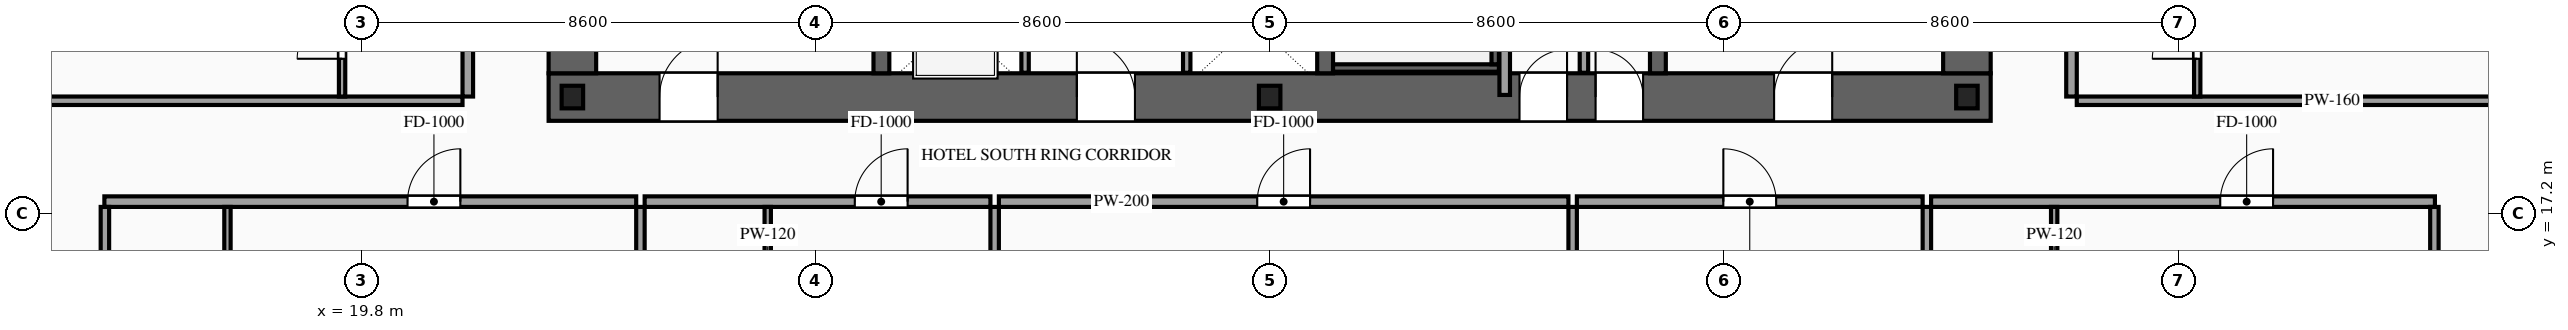
"""IFC4 building model, lengths in metres.
Left out: names, types, materials, properties, quantities, classifications, styles, units other than length and angle.
Written with IfcOpenShell. Run it as: python <this file> out.ifc"""

import sys

from ifc_helpers import new_model, si_unit, direction, frame, frame_2d, origin, origin_2d, place, context, subcontext, project, spatial, rectangle, i_section, extrude, source, transform, mapped, element, fill, save


model = new_model("IFC4")
c1 = context("Model", 3, precision=1e-05, world=origin(), true_north=direction((0.0, 1.0)))
c2 = subcontext(c1, "Body", "Model", "MODEL_VIEW")
j1 = project(units=[si_unit("LENGTHUNIT", "METRE"), si_unit("PLANEANGLEUNIT", "RADIAN")], contexts=[c1])
p1 = place(None, origin())
s1 = spatial("IfcSite", under=j1, at=p1, CompositionType="ELEMENT")
p2 = place(p1, origin())
s2 = spatial("IfcBuilding", under=s1, at=p2, CompositionType="ELEMENT")
p3 = place(p2, frame((0.0, 0.0, 53.2)))
s3 = spatial("IfcBuildingStorey", under=s2, at=p3, CompositionType="ELEMENT", Elevation=53.2)
p4 = place(p3, frame((23.35, 19.4, 0.0), z_axis=(0.0, 0.0, 1.0), x_axis=(1.0, 0.0, 0.0)))
e1 = element("IfcWall", 1, at=p4, inside=s3, PredefinedType="SHEAR", context=c2, shape_type="SweptSolid", body=[
    extrude(rectangle(XDim=27.3, YDim=0.9, at=frame_2d((13.65, 0.0))), origin(), (0.0, 0.0, 1.0), 3.6),
])
p5 = place(p4, frame((2.1, 0.0, 0.0)))
e2 = element("IfcOpeningElement", 2, at=p5, cuts=e1, PredefinedType="OPENING", context=c2, shape_type="SweptSolid", body=[
    extrude(rectangle(XDim=1.1, YDim=2.2, at=frame_2d((0.55, 1.1))), frame((0.0, 0.465, 0.0), z_axis=(0.0, -1.0, 0.0), x_axis=(1.0, 0.0, 0.0)), (0.0, 0.0, 1.0), 0.93),
])
p6 = place(p4, frame((10.0, 0.0, 0.0)))
e3 = element("IfcOpeningElement", 3, at=p6, cuts=e1, PredefinedType="OPENING", context=c2, shape_type="SweptSolid", body=[
    extrude(rectangle(XDim=1.1, YDim=2.2, at=frame_2d((0.55, 1.1))), frame((0.0, 0.465, 0.0), z_axis=(0.0, -1.0, 0.0), x_axis=(1.0, 0.0, 0.0)), (0.0, 0.0, 1.0), 0.93),
])
p7 = place(p4, frame((23.2, 0.0, 0.0)))
e4 = element("IfcOpeningElement", 4, at=p7, cuts=e1, PredefinedType="OPENING", context=c2, shape_type="SweptSolid", body=[
    extrude(rectangle(XDim=1.1, YDim=2.2, at=frame_2d((0.55, 1.1))), frame((0.0, 0.465, 0.0), z_axis=(0.0, -1.0, 0.0), x_axis=(1.0, 0.0, 0.0)), (0.0, 0.0, 1.0), 0.93),
])
p8 = place(p4, frame((19.82, 0.0, 0.0)))
e5 = element("IfcOpeningElement", 5, at=p8, cuts=e1, PredefinedType="OPENING", context=c2, shape_type="SweptSolid", body=[
    extrude(rectangle(XDim=0.9, YDim=2.15, at=frame_2d((0.45, 1.075))), frame((0.0, 0.465, 0.0), z_axis=(0.0, -1.0, 0.0), x_axis=(1.0, 0.0, 0.0)), (0.0, 0.0, 1.0), 0.93),
])
p9 = place(p4, frame((18.38, 0.0, 0.0)))
e6 = element("IfcOpeningElement", 6, at=p9, cuts=e1, PredefinedType="OPENING", context=c2, shape_type="SweptSolid", body=[
    extrude(rectangle(XDim=0.9, YDim=2.15, at=frame_2d((0.45, 1.075))), frame((0.0, 0.465, 0.0), z_axis=(0.0, -1.0, 0.0), x_axis=(1.0, 0.0, 0.0)), (0.0, 0.0, 1.0), 0.93),
])
m1 = source(origin(), c2, "Body", "SweptSolid", [
    extrude(rectangle(XDim=11.9, YDim=0.9, at=frame_2d((5.95, 0.0))), origin(), (0.0, 0.0, 1.0), 3.6),
])
for number, where, z_axis, x_axis in (
    (7, (23.8, 19.85, 0.0), (0.0, 0.0, 1.0), (0.0, 1.0, 0.0)),
    (8, (50.2, 19.85, 0.0), (0.0, 0.0, 1.0), (0.0, 1.0, 0.0)),
):
    element("IfcWall", number, at=place(p3, frame(where, z_axis=z_axis, x_axis=x_axis)), inside=s3, PredefinedType="SHEAR", context=c2, shape_type="MappedRepresentation", body=[
        mapped(m1, transform((0.0, 0.0, 0.0), scale=1.0)),
    ])
m2 = source(origin(), c2, "Body", "SweptSolid", [
    extrude(rectangle(XDim=11.9, YDim=0.3, at=frame_2d((5.95, 0.0))), origin(), (0.0, 0.0, 1.0), 3.6),
])
for number, where, z_axis, x_axis in (
    (9, (29.65, 19.85, 0.0), (0.0, 0.0, 1.0), (0.0, 1.0, 0.0)),
    (10, (38.05, 19.85, 0.0), (0.0, 0.0, 1.0), (0.0, 1.0, 0.0)),
    (11, (44.35, 19.85, 0.0), (0.0, 0.0, 1.0), (0.0, 1.0, 0.0)),
):
    element("IfcWall", number, at=place(p3, frame(where, z_axis=z_axis, x_axis=x_axis)), inside=s3, PredefinedType="SOLIDWALL", context=c2, shape_type="MappedRepresentation", body=[
        mapped(m2, transform((0.0, 0.0, 0.0), scale=1.0)),
    ])
m3 = source(origin(), c2, "Body", "SweptSolid", [
    extrude(i_section(OverallWidth=0.407, OverallDepth=0.428, WebThickness=0.02, FlangeThickness=0.035, at=origin_2d()), origin(), (0.0, 0.0, 1.0), 3.6),
])
for number, where, z_axis, x_axis in (
    (12, (23.8, 19.4, 0.0), (0.0, 0.0, 1.0), (1.0, 0.0, 0.0)),
    (13, (37.0, 19.4, 0.0), (0.0, 0.0, 1.0), (1.0, 0.0, 0.0)),
    (14, (50.2, 19.4, 0.0), (0.0, 0.0, 1.0), (1.0, 0.0, 0.0)),
):
    element("IfcColumn", number, at=place(p3, frame(where, z_axis=z_axis, x_axis=x_axis)), inside=s3, PredefinedType="COLUMN", context=c2, shape_type="MappedRepresentation", body=[
        mapped(m3, transform((0.0, 0.0, 0.0), scale=1.0)),
    ])
p10 = place(p3, frame((32.37, 19.86, 0.0), z_axis=(0.0, 0.0, 1.0), x_axis=(0.0, 1.0, 0.0)))
e15 = element("IfcWall", 15, at=p10, inside=s3, PredefinedType="SOLIDWALL", context=c2, shape_type="SweptSolid", body=[
    extrude(rectangle(XDim=2.04, YDim=0.14, at=frame_2d((1.02, 0.0))), origin(), (0.0, 0.0, 1.0), 3.38),
])
p11 = place(p10, frame((0.47, 0.0, 0.0)))
e16 = element("IfcOpeningElement", 16, at=p11, cuts=e15, PredefinedType="OPENING", context=c2, shape_type="SweptSolid", body=[
    extrude(rectangle(XDim=1.1, YDim=2.2, at=frame_2d((0.55, 1.1))), frame((0.0, 0.085, 0.0), z_axis=(0.0, -1.0, 0.0), x_axis=(1.0, 0.0, 0.0)), (0.0, 0.0, 1.0), 0.17),
])
m4 = source(origin(), c2, "Body", "SweptSolid", [
    extrude(rectangle(XDim=2.04, YDim=0.14, at=frame_2d((1.02, 0.0))), origin(), (0.0, 0.0, 1.0), 3.38),
])
p12 = place(p3, frame((35.43, 19.86, 0.0), z_axis=(0.0, 0.0, 1.0), x_axis=(0.0, 1.0, 0.0)))
e17 = element("IfcWall", 17, at=p12, inside=s3, PredefinedType="SOLIDWALL", context=c2, shape_type="MappedRepresentation", body=[
    mapped(m4, transform((0.0, 0.0, 0.0), scale=1.0)),
])
m5 = source(origin(), c2, "Body", "SweptSolid", [
    extrude(rectangle(XDim=3.14, YDim=0.14, at=frame_2d((1.57, 0.0))), origin(), (0.0, 0.0, 1.0), 3.38),
])
p13 = place(p3, frame((38.2, 19.95, 0.0), z_axis=(0.0, 0.0, 1.0), x_axis=(1.0, 0.0, 0.0)))
e18 = element("IfcWall", 18, at=p13, inside=s3, PredefinedType="SOLIDWALL", context=c2, shape_type="MappedRepresentation", body=[
    mapped(m5, transform((0.0, 0.0, 0.0), scale=1.0)),
])
m6 = source(origin(), c2, "Body", "SweptSolid", [
    extrude(rectangle(XDim=8.94, YDim=0.14, at=frame_2d((4.47, 0.0))), origin(), (0.0, 0.0, 1.0), 3.38),
])
p14 = place(p3, frame((41.27, 20.02, 0.0), z_axis=(0.0, 0.0, 1.0), x_axis=(0.0, 1.0, 0.0)))
e19 = element("IfcWall", 19, at=p14, inside=s3, PredefinedType="SOLIDWALL", context=c2, shape_type="MappedRepresentation", body=[
    mapped(m6, transform((0.0, 0.0, 0.0), scale=1.0)),
])
m7 = source(origin(), c2, "Body", "SweptSolid", [
    extrude(rectangle(XDim=1.34, YDim=0.16, at=frame_2d((0.67, 0.0))), origin(), (0.0, 0.0, 1.0), 3.38),
])
p15 = place(p3, frame((42.95, 19.86, 0.0), z_axis=(0.0, 0.0, 1.0), x_axis=(0.0, 1.0, 0.0)))
e20 = element("IfcWall", 20, at=p15, inside=s3, PredefinedType="PARTITIONING", context=c2, shape_type="MappedRepresentation", body=[
    mapped(m7, transform((0.0, 0.0, 0.0), scale=1.0)),
])
m8 = source(origin(), c2, "Body", "SweptSolid", [
    extrude(rectangle(XDim=6.51, YDim=0.2, at=frame_2d((3.255, 0.0))), origin(), (0.0, 0.0, 1.0), 3.38),
])
p16 = place(p3, frame((41.45, 19.44, 0.0), z_axis=(0.0, 0.0, 1.0), x_axis=(0.0, 1.0, 0.0)))
e21 = element("IfcWall", 21, at=p16, inside=s3, PredefinedType="PARTITIONING", context=c2, shape_type="MappedRepresentation", body=[
    mapped(m8, transform((0.0, 0.0, 0.0), scale=1.0)),
])
p17 = place(p3, frame((14.94, 17.42, 0.0), z_axis=(0.0, 0.0, 1.0), x_axis=(1.0, 0.0, 0.0)))
e22 = element("IfcWall", 22, at=p17, inside=s3, PredefinedType="PARTITIONING", context=c2, shape_type="SweptSolid", body=[
    extrude(rectangle(XDim=10.068, YDim=0.2, at=frame_2d((5.034, 0.0))), origin(), (0.0, 0.0, 1.0), 3.38),
])
p18 = place(p17, frame((5.739, 0.0, 0.0)))
e23 = element("IfcOpeningElement", 23, at=p18, cuts=e22, PredefinedType="OPENING", context=c2, shape_type="SweptSolid", body=[
    extrude(rectangle(XDim=1.0, YDim=2.2, at=frame_2d((0.5, 1.1))), frame((0.0, 0.115, 0.0), z_axis=(0.0, -1.0, 0.0), x_axis=(1.0, 0.0, 0.0)), (0.0, 0.0, 1.0), 0.23),
])
m9 = source(origin(), c2, "Body", "SweptSolid", [
    extrude(rectangle(XDim=16.47, YDim=0.16, at=frame_2d((8.235, 0.0))), origin(), (0.0, 0.0, 1.0), 3.38),
])
p19 = place(p3, frame((25.088, 0.85, 0.0), z_axis=(0.0, 0.0, 1.0), x_axis=(0.0, 1.0, 0.0)))
e24 = element("IfcWall", 24, at=p19, inside=s3, PredefinedType="PARTITIONING", context=c2, shape_type="MappedRepresentation", body=[
    mapped(m9, transform((0.0, 0.0, 0.0), scale=1.0)),
])
m10 = source(origin(), c2, "Body", "SweptSolid", [
    extrude(rectangle(XDim=2.42, YDim=0.12, at=frame_2d((1.21, 0.0))), origin(), (0.0, 0.0, 1.0), 3.38),
])
p20 = place(p3, frame((17.27, 14.9, 0.0), z_axis=(0.0, 0.0, 1.0), x_axis=(0.0, 1.0, 0.0)))
e25 = element("IfcWall", 25, at=p20, inside=s3, PredefinedType="PARTITIONING", context=c2, shape_type="MappedRepresentation", body=[
    mapped(m10, transform((0.0, 0.0, 0.0), scale=1.0)),
])
p21 = place(p3, frame((25.168, 17.42, 0.0), z_axis=(0.0, 0.0, 1.0), x_axis=(1.0, 0.0, 0.0)))
e26 = element("IfcWall", 26, at=p21, inside=s3, PredefinedType="PARTITIONING", context=c2, shape_type="SweptSolid", body=[
    extrude(rectangle(XDim=6.546, YDim=0.2, at=frame_2d((3.273, 0.0))), origin(), (0.0, 0.0, 1.0), 3.38),
])
p22 = place(p21, frame((3.978, 0.0, 0.0)))
e27 = element("IfcOpeningElement", 27, at=p22, cuts=e26, PredefinedType="OPENING", context=c2, shape_type="SweptSolid", body=[
    extrude(rectangle(XDim=1.0, YDim=2.2, at=frame_2d((0.5, 1.1))), frame((0.0, 0.115, 0.0), z_axis=(0.0, -1.0, 0.0), x_axis=(1.0, 0.0, 0.0)), (0.0, 0.0, 1.0), 0.23),
])
p23 = place(p3, frame((31.794, 0.85, 0.0), z_axis=(0.0, 0.0, 1.0), x_axis=(0.0, 1.0, 0.0)))
e28 = element("IfcWall", 28, at=p23, inside=s3, PredefinedType="PARTITIONING", context=c2, shape_type="MappedRepresentation", body=[
    mapped(m9, transform((0.0, 0.0, 0.0), scale=1.0)),
])
p24 = place(p3, frame((27.498, 14.9, 0.0), z_axis=(0.0, 0.0, 1.0), x_axis=(0.0, 1.0, 0.0)))
e29 = element("IfcWall", 29, at=p24, inside=s3, PredefinedType="PARTITIONING", context=c2, shape_type="MappedRepresentation", body=[
    mapped(m10, transform((0.0, 0.0, 0.0), scale=1.0)),
])
p25 = place(p3, frame((31.874, 17.42, 0.0), z_axis=(0.0, 0.0, 1.0), x_axis=(1.0, 0.0, 0.0)))
e30 = element("IfcWall", 30, at=p25, inside=s3, PredefinedType="PARTITIONING", context=c2, shape_type="SweptSolid", body=[
    extrude(rectangle(XDim=10.782, YDim=0.2, at=frame_2d((5.391, 0.0))), origin(), (0.0, 0.0, 1.0), 3.38),
])
p26 = place(p25, frame((4.891, 0.0, 0.0)))
e31 = element("IfcOpeningElement", 31, at=p26, cuts=e30, PredefinedType="OPENING", context=c2, shape_type="SweptSolid", body=[
    extrude(rectangle(XDim=1.0, YDim=2.2, at=frame_2d((0.5, 1.1))), frame((0.0, 0.115, 0.0), z_axis=(0.0, -1.0, 0.0), x_axis=(1.0, 0.0, 0.0)), (0.0, 0.0, 1.0), 0.23),
])
p27 = place(p3, frame((42.736, 0.85, 0.0), z_axis=(0.0, 0.0, 1.0), x_axis=(0.0, 1.0, 0.0)))
e32 = element("IfcWall", 32, at=p27, inside=s3, PredefinedType="PARTITIONING", context=c2, shape_type="MappedRepresentation", body=[
    mapped(m9, transform((0.0, 0.0, 0.0), scale=1.0)),
])
p28 = place(p3, frame((42.816, 17.42, 0.0), z_axis=(0.0, 0.0, 1.0), x_axis=(1.0, 0.0, 0.0)))
e33 = element("IfcWall", 33, at=p28, inside=s3, PredefinedType="PARTITIONING", context=c2, shape_type="SweptSolid", body=[
    extrude(rectangle(XDim=6.546, YDim=0.2, at=frame_2d((3.273, 0.0))), origin(), (0.0, 0.0, 1.0), 3.38),
])
p29 = place(p28, frame((2.773, 0.0, 0.0)))
e34 = element("IfcOpeningElement", 34, at=p29, cuts=e33, PredefinedType="OPENING", context=c2, shape_type="SweptSolid", body=[
    extrude(rectangle(XDim=1.0, YDim=2.2, at=frame_2d((0.5, 1.1))), frame((0.0, 0.115, 0.0), z_axis=(0.0, -1.0, 0.0), x_axis=(1.0, 0.0, 0.0)), (0.0, 0.0, 1.0), 0.23),
])
p30 = place(p3, frame((49.442, 0.85, 0.0), z_axis=(0.0, 0.0, 1.0), x_axis=(0.0, 1.0, 0.0)))
e35 = element("IfcWall", 35, at=p30, inside=s3, PredefinedType="PARTITIONING", context=c2, shape_type="MappedRepresentation", body=[
    mapped(m9, transform((0.0, 0.0, 0.0), scale=1.0)),
])
p31 = place(p3, frame((49.522, 17.42, 0.0), z_axis=(0.0, 0.0, 1.0), x_axis=(1.0, 0.0, 0.0)))
e36 = element("IfcWall", 36, at=p31, inside=s3, PredefinedType="PARTITIONING", context=c2, shape_type="SweptSolid", body=[
    extrude(rectangle(XDim=9.538, YDim=0.2, at=frame_2d((4.769, 0.0))), origin(), (0.0, 0.0, 1.0), 3.38),
])
p32 = place(p31, frame((5.474, 0.0, 0.0)))
e37 = element("IfcOpeningElement", 37, at=p32, cuts=e36, PredefinedType="OPENING", context=c2, shape_type="SweptSolid", body=[
    extrude(rectangle(XDim=1.0, YDim=2.2, at=frame_2d((0.5, 1.1))), frame((0.0, 0.115, 0.0), z_axis=(0.0, -1.0, 0.0), x_axis=(1.0, 0.0, 0.0)), (0.0, 0.0, 1.0), 0.23),
])
m11 = source(origin(), c2, "Body", "SweptSolid", [
    extrude(rectangle(XDim=16.32, YDim=0.16, at=frame_2d((8.16, 0.0))), origin(), (0.0, 0.0, 1.0), 3.38),
])
for number, where, z_axis, x_axis in (
    (38, (14.95, 1.0, 0.0), (0.0, 0.0, 1.0), (0.0, 1.0, 0.0)),
    (39, (59.05, 1.0, 0.0), (0.0, 0.0, 1.0), (0.0, 1.0, 0.0)),
):
    element("IfcWall", number, at=place(p3, frame(where, z_axis=z_axis, x_axis=x_axis)), inside=s3, PredefinedType="PARTITIONING", context=c2, shape_type="MappedRepresentation", body=[
        mapped(m11, transform((0.0, 0.0, 0.0), scale=1.0)),
    ])
p33 = place(p3, frame((51.852, 14.9, 0.0), z_axis=(0.0, 0.0, 1.0), x_axis=(0.0, 1.0, 0.0)))
e40 = element("IfcWall", 40, at=p33, inside=s3, PredefinedType="PARTITIONING", context=c2, shape_type="MappedRepresentation", body=[
    mapped(m10, transform((0.0, 0.0, 0.0), scale=1.0)),
])
p34 = place(p3, frame((21.82, 19.41, 0.0), z_axis=(0.0, 0.0, 1.0), x_axis=(0.0, 1.0, 0.0)))
e41 = element("IfcWall", 41, at=p34, inside=s3, PredefinedType="PARTITIONING", context=c2, shape_type="SweptSolid", body=[
    extrude(rectangle(XDim=6.31, YDim=0.2, at=frame_2d((3.155, 0.0))), origin(), (0.0, 0.0, 1.0), 3.38),
])
p35 = place(p34, frame((3.835, 0.0, 0.0)))
e42 = element("IfcOpeningElement", 42, at=p35, cuts=e41, PredefinedType="OPENING", context=c2, shape_type="SweptSolid", body=[
    extrude(rectangle(XDim=1.0, YDim=2.2, at=frame_2d((0.5, 1.1))), frame((0.0, 0.115, 0.0), z_axis=(0.0, -1.0, 0.0), x_axis=(1.0, 0.0, 0.0)), (0.0, 0.0, 1.0), 0.23),
])
m12 = source(origin(), c2, "Body", "SweptSolid", [
    extrude(rectangle(XDim=9.67, YDim=0.16, at=frame_2d((4.835, 0.0))), origin(), (0.0, 0.0, 1.0), 2.875),
])
p36 = place(p3, frame((12.05, 19.33, 0.0), z_axis=(0.0, 0.0, 1.0), x_axis=(1.0, 0.0, 0.0)))
e43 = element("IfcWall", 43, at=p36, inside=s3, PredefinedType="PARTITIONING", context=c2, shape_type="MappedRepresentation", body=[
    mapped(m12, transform((0.0, 0.0, 0.0), scale=1.0)),
])
p37 = place(p3, frame((19.44, 19.41, 0.0), z_axis=(0.0, 0.0, 1.0), x_axis=(0.0, 1.0, 0.0)))
e44 = element("IfcWall", 44, at=p37, inside=s3, PredefinedType="PARTITIONING", context=c2, shape_type="SweptSolid", body=[
    extrude(rectangle(XDim=2.28, YDim=0.12, at=frame_2d((1.14, 0.0))), origin(), (0.0, 0.0, 1.0), 3.38),
])
p38 = place(p37, frame((0.715, 0.0, 0.0)))
e45 = element("IfcOpeningElement", 45, at=p38, cuts=e44, PredefinedType="OPENING", context=c2, shape_type="SweptSolid", body=[
    extrude(rectangle(XDim=0.85, YDim=2.1, at=frame_2d((0.425, 1.05))), frame((0.0, 0.075, 0.0), z_axis=(0.0, -1.0, 0.0), x_axis=(1.0, 0.0, 0.0)), (0.0, 0.0, 1.0), 0.15),
])
p39 = place(p3, frame((52.18, 19.41, 0.0), z_axis=(0.0, 0.0, 1.0), x_axis=(0.0, 1.0, 0.0)))
e46 = element("IfcWall", 46, at=p39, inside=s3, PredefinedType="PARTITIONING", context=c2, shape_type="SweptSolid", body=[
    extrude(rectangle(XDim=6.31, YDim=0.2, at=frame_2d((3.155, 0.0))), origin(), (0.0, 0.0, 1.0), 3.38),
])
p40 = place(p39, frame((3.835, 0.0, 0.0)))
e47 = element("IfcOpeningElement", 47, at=p40, cuts=e46, PredefinedType="OPENING", context=c2, shape_type="SweptSolid", body=[
    extrude(rectangle(XDim=1.0, YDim=2.2, at=frame_2d((0.5, 1.1))), frame((0.0, 0.115, 0.0), z_axis=(0.0, -1.0, 0.0), x_axis=(1.0, 0.0, 0.0)), (0.0, 0.0, 1.0), 0.23),
])
p41 = place(p3, frame((52.28, 19.33, 0.0), z_axis=(0.0, 0.0, 1.0), x_axis=(1.0, 0.0, 0.0)))
e48 = element("IfcWall", 48, at=p41, inside=s3, PredefinedType="PARTITIONING", context=c2, shape_type="MappedRepresentation", body=[
    mapped(m12, transform((0.0, 0.0, 0.0), scale=1.0)),
])
p42 = place(p3, frame((54.56, 19.41, 0.0), z_axis=(0.0, 0.0, 1.0), x_axis=(0.0, 1.0, 0.0)))
e49 = element("IfcWall", 49, at=p42, inside=s3, PredefinedType="PARTITIONING", context=c2, shape_type="SweptSolid", body=[
    extrude(rectangle(XDim=2.28, YDim=0.12, at=frame_2d((1.14, 0.0))), origin(), (0.0, 0.0, 1.0), 3.38),
])
p43 = place(p42, frame((0.715, 0.0, 0.0)))
e50 = element("IfcOpeningElement", 50, at=p43, cuts=e49, PredefinedType="OPENING", context=c2, shape_type="SweptSolid", body=[
    extrude(rectangle(XDim=0.85, YDim=2.1, at=frame_2d((0.425, 1.05))), frame((0.0, 0.075, 0.0), z_axis=(0.0, -1.0, 0.0), x_axis=(1.0, 0.0, 0.0)), (0.0, 0.0, 1.0), 0.15),
])
m13 = source(origin(), c2, "Body", "SweptSolid", [
    extrude(rectangle(XDim=1.1, YDim=2.2, at=frame_2d((0.55, 1.1))), frame((0.0, 0.025, 0.0), z_axis=(0.0, -1.0, 0.0), x_axis=(1.0, 0.0, 0.0)), (0.0, 0.0, 1.0), 0.05),
])
p44 = place(p5, origin())
e51 = element("IfcDoor", 51, at=p44, inside=s3, OperationType="SINGLE_SWING_RIGHT", PredefinedType="DOOR", context=c2, shape_type="MappedRepresentation", body=[
    mapped(m13, transform((0.0, 0.0, 0.0), scale=1.0)),
])
fill(e2, e51)
p45 = place(p6, origin())
e52 = element("IfcDoor", 52, at=p45, inside=s3, OperationType="SINGLE_SWING_LEFT", PredefinedType="DOOR", context=c2, shape_type="MappedRepresentation", body=[
    mapped(m13, transform((0.0, 0.0, 0.0), scale=1.0)),
])
fill(e3, e52)
p46 = place(p7, origin())
e53 = element("IfcDoor", 53, at=p46, inside=s3, OperationType="SINGLE_SWING_RIGHT", PredefinedType="DOOR", context=c2, shape_type="MappedRepresentation", body=[
    mapped(m13, transform((0.0, 0.0, 0.0), scale=1.0)),
])
fill(e4, e53)
m14 = source(origin(), c2, "Body", "SweptSolid", [
    extrude(rectangle(XDim=0.9, YDim=2.15, at=frame_2d((0.45, 1.075))), frame((0.0, 0.025, 0.0), z_axis=(0.0, -1.0, 0.0), x_axis=(1.0, 0.0, 0.0)), (0.0, 0.0, 1.0), 0.05),
])
p47 = place(p8, origin())
e54 = element("IfcDoor", 54, at=p47, inside=s3, OperationType="SINGLE_SWING_LEFT", PredefinedType="DOOR", context=c2, shape_type="MappedRepresentation", body=[
    mapped(m14, transform((0.0, 0.0, 0.0), scale=1.0)),
])
fill(e5, e54)
p48 = place(p9, origin())
e55 = element("IfcDoor", 55, at=p48, inside=s3, OperationType="SINGLE_SWING_RIGHT", PredefinedType="DOOR", context=c2, shape_type="MappedRepresentation", body=[
    mapped(m14, transform((0.0, 0.0, 0.0), scale=1.0)),
])
fill(e6, e55)
m15 = source(origin(), c2, "Body", "SweptSolid", [
    extrude(rectangle(XDim=1.0, YDim=2.2, at=frame_2d((0.5, 1.1))), frame((0.0, 0.025, 0.0), z_axis=(0.0, -1.0, 0.0), x_axis=(1.0, 0.0, 0.0)), (0.0, 0.0, 1.0), 0.05),
])
p49 = place(p18, origin())
e56 = element("IfcDoor", 56, at=p49, inside=s3, OperationType="SINGLE_SWING_RIGHT", PredefinedType="DOOR", context=c2, shape_type="MappedRepresentation", body=[
    mapped(m15, transform((0.0, 0.0, 0.0), scale=1.0)),
])
fill(e23, e56)
p50 = place(p22, origin())
e57 = element("IfcDoor", 57, at=p50, inside=s3, OperationType="SINGLE_SWING_RIGHT", PredefinedType="DOOR", context=c2, shape_type="MappedRepresentation", body=[
    mapped(m15, transform((0.0, 0.0, 0.0), scale=1.0)),
])
fill(e27, e57)
p51 = place(p26, origin())
e58 = element("IfcDoor", 58, at=p51, inside=s3, OperationType="SINGLE_SWING_RIGHT", PredefinedType="DOOR", context=c2, shape_type="MappedRepresentation", body=[
    mapped(m15, transform((0.0, 0.0, 0.0), scale=1.0)),
])
fill(e31, e58)
p52 = place(p29, origin())
e59 = element("IfcDoor", 59, at=p52, inside=s3, OperationType="SINGLE_SWING_LEFT", PredefinedType="DOOR", context=c2, shape_type="MappedRepresentation", body=[
    mapped(m15, transform((0.0, 0.0, 0.0), scale=1.0)),
])
fill(e34, e59)
p53 = place(p32, origin())
e60 = element("IfcDoor", 60, at=p53, inside=s3, OperationType="SINGLE_SWING_RIGHT", PredefinedType="DOOR", context=c2, shape_type="MappedRepresentation", body=[
    mapped(m15, transform((0.0, 0.0, 0.0), scale=1.0)),
])
fill(e37, e60)
m16 = source(origin(), c2, "Body", "SweptSolid", [
    extrude(rectangle(XDim=0.85, YDim=2.1, at=frame_2d((0.425, 1.05))), frame((0.0, 0.025, 0.0), z_axis=(0.0, -1.0, 0.0), x_axis=(1.0, 0.0, 0.0)), (0.0, 0.0, 1.0), 0.05),
])
p54 = place(p38, origin())
e61 = element("IfcDoor", 61, at=p54, inside=s3, OperationType="SINGLE_SWING_LEFT", PredefinedType="DOOR", context=c2, shape_type="MappedRepresentation", body=[
    mapped(m16, transform((0.0, 0.0, 0.0), scale=1.0)),
])
fill(e45, e61)
p55 = place(p43, origin())
e62 = element("IfcDoor", 62, at=p55, inside=s3, OperationType="SINGLE_SWING_LEFT", PredefinedType="DOOR", context=c2, shape_type="MappedRepresentation", body=[
    mapped(m16, transform((0.0, 0.0, 0.0), scale=1.0)),
])
fill(e50, e62)
save(model, sys.argv[1])
